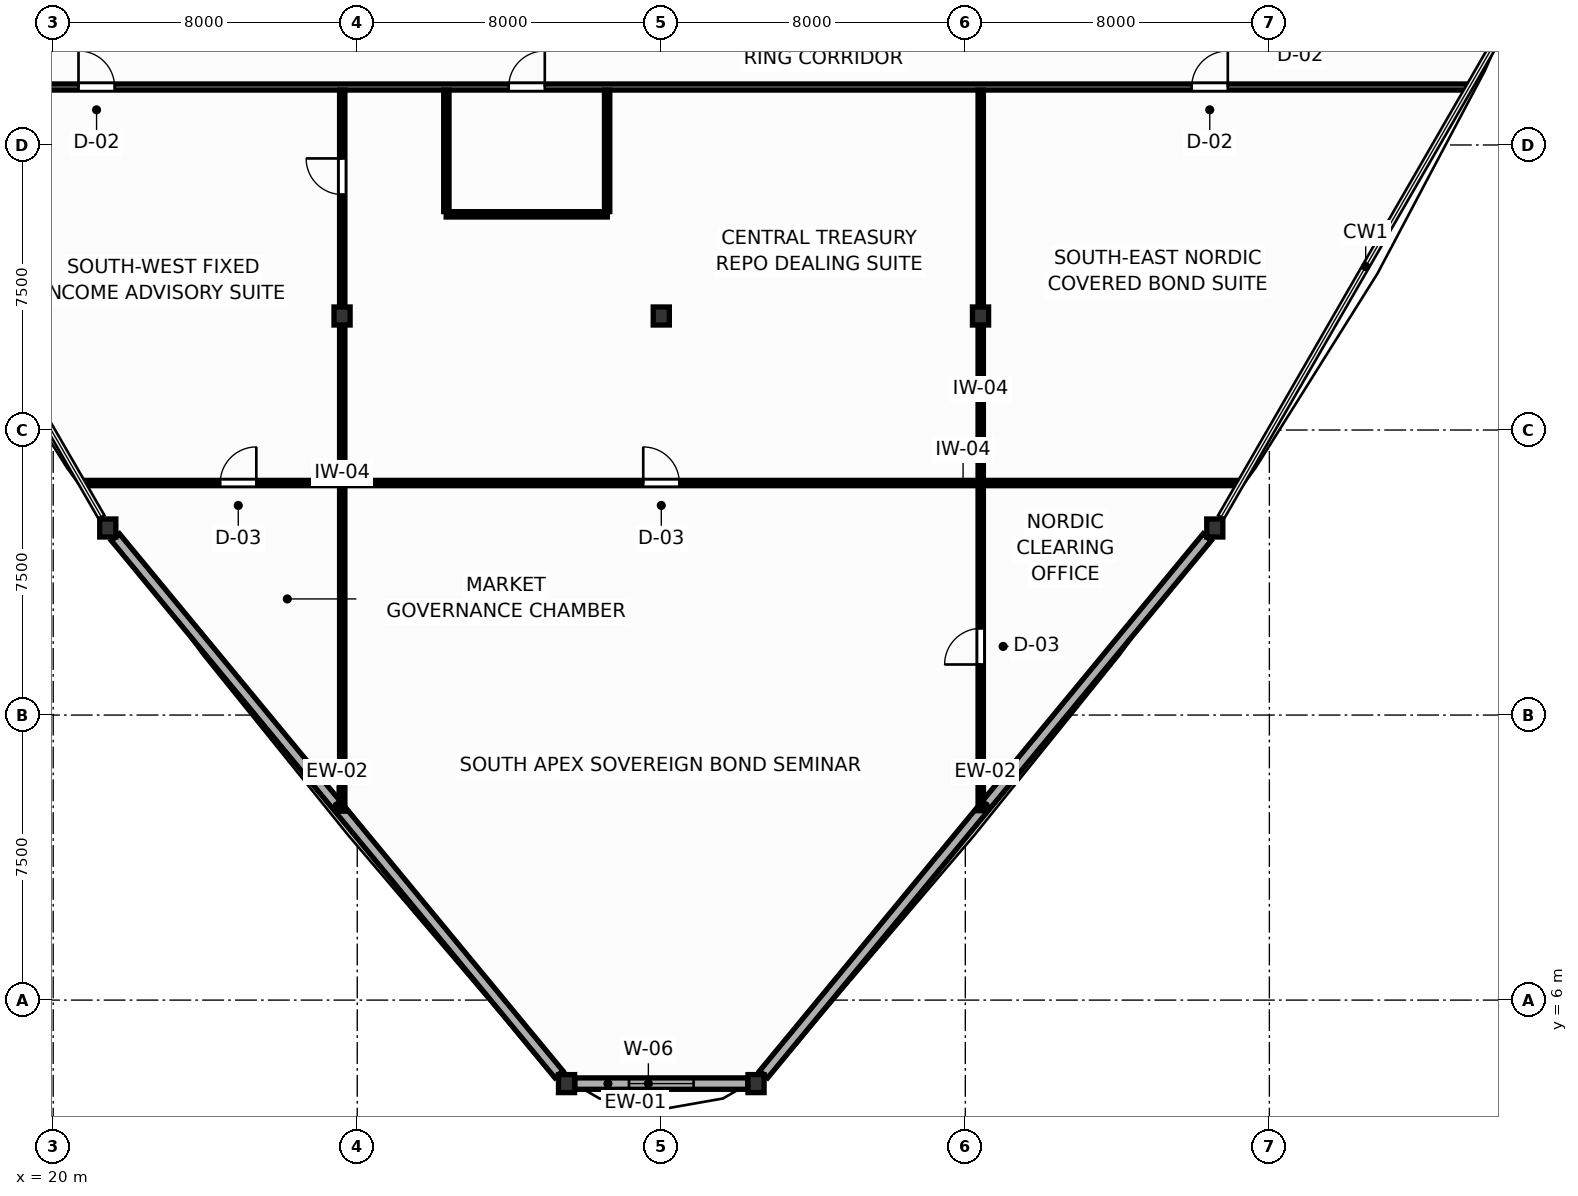
"""IFC4 building model, lengths in metres.
Left out: names, types, materials, properties, quantities, classifications, styles, units other than length and angle.
Written with IfcOpenShell. Run it as: python <this file> out.ifc"""

import sys

from ifc_helpers import new_model, si_unit, direction, frame, frame_2d, origin, origin_2d, place, context, subcontext, project, spatial, rectangle, i_section, extrude, source, transform, mapped, element, fill, save


model = new_model("IFC4")
c1 = context("Model", 3, precision=1e-05, world=origin(), true_north=direction((0.0, 1.0)))
c2 = subcontext(c1, "Body", "Model", "MODEL_VIEW")
j1 = project(units=[si_unit("LENGTHUNIT", "METRE"), si_unit("PLANEANGLEUNIT", "RADIAN")], contexts=[c1])
p1 = place(None, origin())
s1 = spatial("IfcSite", under=j1, at=p1, CompositionType="ELEMENT")
p2 = place(p1, origin())
s2 = spatial("IfcBuilding", under=s1, at=p2, CompositionType="ELEMENT")
p3 = place(p2, frame((0.0, 0.0, 43.5)))
s3 = spatial("IfcBuildingStorey", under=s2, at=p3, CompositionType="ELEMENT", Elevation=43.5)
m1 = source(origin(), c2, "Body", "SweptSolid", [
    extrude(i_section(OverallWidth=0.424, OverallDepth=0.474, WebThickness=0.045, FlangeThickness=0.072, FilletRadius=0.015, at=origin_2d()), origin(), (0.0, 0.0, 1.0), 3.9),
])
for number, where, z_axis, x_axis in (
    (1, (27.6, 24.0, 0.0), (0.0, 0.0, 1.0), (1.0, 0.0, 0.0)),
    (2, (44.4, 24.0, 0.0), (0.0, 0.0, 1.0), (1.0, 0.0, 0.0)),
    (3, (36.0, 24.0, 0.0), (0.0, 0.0, 1.0), (1.0, 0.0, 0.0)),
    (4, (21.436, 18.422, 0.0), (0.0, 0.0, 1.0), (1.0, 0.0, 0.0)),
    (5, (33.507, 3.803, 0.0), (0.0, 0.0, 1.0), (1.0, 0.0, 0.0)),
    (6, (38.493, 3.803, 0.0), (0.0, 0.0, 1.0), (1.0, 0.0, 0.0)),
    (7, (50.564, 18.422, 0.0), (0.0, 0.0, 1.0), (1.0, 0.0, 0.0)),
):
    element("IfcColumn", number, at=place(p3, frame(where, z_axis=z_axis, x_axis=x_axis)), inside=s3, PredefinedType="COLUMN", context=c2, shape_type="MappedRepresentation", body=[
        mapped(m1, transform((0.0, 0.0, 0.0), scale=1.0)),
    ])
p4 = place(p3, frame((21.636, 18.18, 0.0), z_axis=(0.0, 0.0, 1.0), x_axis=(0.636707615974, -0.771105318203, 0.0)))
e8 = element("IfcWall", 8, at=p4, inside=s3, PredefinedType="SOLIDWALL", context=c2, shape_type="SweptSolid", body=[
    extrude(rectangle(XDim=18.331, YDim=0.28, at=frame_2d((9.166, 0.0))), origin(), (0.0, 0.0, 1.0), 2.08),
])
p5 = place(p3, frame((33.724, 3.803, 0.0), z_axis=(0.0, 0.0, 1.0), x_axis=(1.0, 0.0, 0.0)))
e9 = element("IfcWall", 9, at=p5, inside=s3, PredefinedType="SOLIDWALL", context=c2, shape_type="SweptSolid", body=[
    extrude(rectangle(XDim=4.552, YDim=0.3, at=frame_2d((2.276, 0.0))), origin(), (0.0, 0.0, 1.0), 2.08),
])
p6 = place(p5, frame((1.426, 0.0, 0.75)))
e10 = element("IfcOpeningElement", 10, at=p6, cuts=e9, PredefinedType="OPENING", context=c2, shape_type="SweptSolid", body=[
    extrude(rectangle(XDim=1.7, YDim=1.15, at=frame_2d((0.85, 0.575))), frame((0.0, 0.16, 0.0), z_axis=(0.0, -1.0, 0.0), x_axis=(1.0, 0.0, 0.0)), (0.0, 0.0, 1.0), 0.32),
])
p7 = place(p3, frame((38.693, 4.045, 0.0), z_axis=(0.0, 0.0, 1.0), x_axis=(0.636707615974, 0.771105318203, 0.0)))
e11 = element("IfcWall", 11, at=p7, inside=s3, PredefinedType="SOLIDWALL", context=c2, shape_type="SweptSolid", body=[
    extrude(rectangle(XDim=18.331, YDim=0.28, at=frame_2d((9.166, 0.0))), origin(), (0.0, 0.0, 1.0), 2.08),
])
p8 = place(p3, frame((14.757, 30.025, 0.0), z_axis=(0.0, 0.0, 1.0), x_axis=(1.0, 0.0, 0.0)))
e12 = element("IfcWall", 12, at=p8, inside=s3, PredefinedType="PARTITIONING", context=c2, shape_type="SweptSolid", body=[
    extrude(rectangle(XDim=42.485, YDim=0.16, at=frame_2d((21.243, 0.0))), origin(), (0.0, 0.0, 1.0), 3.68),
])
p9 = place(p8, frame((17.228, 0.0, 0.0)))
e13 = element("IfcOpeningElement", 13, at=p9, cuts=e12, PredefinedType="OPENING", context=c2, shape_type="SweptSolid", body=[
    extrude(rectangle(XDim=0.95, YDim=2.05, at=frame_2d((0.475, 1.025))), frame((0.0, 0.09, 0.0), z_axis=(0.0, -1.0, 0.0), x_axis=(1.0, 0.0, 0.0)), (0.0, 0.0, 1.0), 0.18),
])
p10 = place(p8, frame((5.908, 0.0, 0.0)))
e14 = element("IfcOpeningElement", 14, at=p10, cuts=e12, PredefinedType="OPENING", context=c2, shape_type="SweptSolid", body=[
    extrude(rectangle(XDim=0.95, YDim=2.05, at=frame_2d((0.475, 1.025))), frame((0.0, 0.09, 0.0), z_axis=(0.0, -1.0, 0.0), x_axis=(1.0, 0.0, 0.0)), (0.0, 0.0, 1.0), 0.18),
])
p11 = place(p8, frame((35.199, 0.0, 0.0)))
e15 = element("IfcOpeningElement", 15, at=p11, cuts=e12, PredefinedType="OPENING", context=c2, shape_type="SweptSolid", body=[
    extrude(rectangle(XDim=0.95, YDim=2.05, at=frame_2d((0.475, 1.025))), frame((0.0, 0.09, 0.0), z_axis=(0.0, -1.0, 0.0), x_axis=(1.0, 0.0, 0.0)), (0.0, 0.0, 1.0), 0.18),
])
p12 = place(p3, frame((20.773, 19.605, 0.0), z_axis=(0.0, 0.0, 1.0), x_axis=(1.0, 0.0, 0.0)))
e16 = element("IfcWall", 16, at=p12, inside=s3, PredefinedType="PARTITIONING", context=c2, shape_type="SweptSolid", body=[
    extrude(rectangle(XDim=30.454, YDim=0.14, at=frame_2d((15.227, 0.0))), origin(), (0.0, 0.0, 1.0), 3.68),
])
p13 = place(p12, frame((3.621, 0.0, 0.0)))
e17 = element("IfcOpeningElement", 17, at=p13, cuts=e16, PredefinedType="OPENING", context=c2, shape_type="SweptSolid", body=[
    extrude(rectangle(XDim=0.95, YDim=2.05, at=frame_2d((0.475, 1.025))), frame((0.0, 0.08, 0.0), z_axis=(0.0, -1.0, 0.0), x_axis=(1.0, 0.0, 0.0)), (0.0, 0.0, 1.0), 0.16),
])
p14 = place(p12, frame((14.752, 0.0, 0.0)))
e18 = element("IfcOpeningElement", 18, at=p14, cuts=e16, PredefinedType="OPENING", context=c2, shape_type="SweptSolid", body=[
    extrude(rectangle(XDim=0.95, YDim=2.05, at=frame_2d((0.475, 1.025))), frame((0.0, 0.08, 0.0), z_axis=(0.0, -1.0, 0.0), x_axis=(1.0, 0.0, 0.0)), (0.0, 0.0, 1.0), 0.16),
])
p15 = place(p3, frame((27.605, 10.971, 0.0), z_axis=(0.0, 0.0, 1.0), x_axis=(0.0, 1.0, 0.0)))
e19 = element("IfcWall", 19, at=p15, inside=s3, PredefinedType="PARTITIONING", context=c2, shape_type="SweptSolid", body=[
    extrude(rectangle(XDim=18.972, YDim=0.14, at=frame_2d((9.486, 0.0))), origin(), (0.0, 0.0, 1.0), 2.24),
])
p16 = place(p15, frame((16.225, 0.0, 0.0)))
e20 = element("IfcOpeningElement", 20, at=p16, cuts=e19, PredefinedType="OPENING", context=c2, shape_type="SweptSolid", body=[
    extrude(rectangle(XDim=0.95, YDim=2.05, at=frame_2d((0.475, 1.025))), frame((0.0, 0.08, 0.0), z_axis=(0.0, -1.0, 0.0), x_axis=(1.0, 0.0, 0.0)), (0.0, 0.0, 1.0), 0.16),
])
p17 = place(p3, frame((44.405, 10.983, 0.0), z_axis=(0.0, 0.0, 1.0), x_axis=(0.0, 1.0, 0.0)))
e21 = element("IfcWall", 21, at=p17, inside=s3, PredefinedType="PARTITIONING", context=c2, shape_type="SweptSolid", body=[
    extrude(rectangle(XDim=18.96, YDim=0.14, at=frame_2d((9.48, 0.0))), origin(), (0.0, 0.0, 1.0), 2.24),
])
p18 = place(p17, frame((3.847, 0.0, 0.0)))
e22 = element("IfcOpeningElement", 22, at=p18, cuts=e21, PredefinedType="OPENING", context=c2, shape_type="SweptSolid", body=[
    extrude(rectangle(XDim=0.95, YDim=2.05, at=frame_2d((0.475, 1.025))), frame((0.0, 0.08, 0.0), z_axis=(0.0, -1.0, 0.0), x_axis=(1.0, 0.0, 0.0)), (0.0, 0.0, 1.0), 0.16),
])
p19 = place(p3, frame((30.34, 26.675, 0.0), z_axis=(0.0, 0.0, 1.0), x_axis=(1.0, 0.0, 0.0)))
e23 = element("IfcWall", 23, at=p19, inside=s3, PredefinedType="PARTITIONING", context=c2, shape_type="SweptSolid", body=[
    extrude(rectangle(XDim=4.24, YDim=0.14, at=frame_2d((2.12, 0.0))), origin(), (0.0, 0.0, 1.0), 3.68),
])
for number, where, z_axis, x_axis in (
    (24, (34.575, 26.747, 0.0), (0.0, 0.0, 1.0), (0.0, 1.0, 0.0)),
    (25, (30.345, 26.747, 0.0), (0.0, 0.0, 1.0), (0.0, 1.0, 0.0)),
):
    element("IfcWall", number, at=place(p3, frame(where, z_axis=z_axis, x_axis=x_axis)), inside=s3, PredefinedType="PARTITIONING", context=c2, shape_type="SweptSolid", body=[
        extrude(rectangle(XDim=3.196, YDim=0.14, at=frame_2d((1.598, 0.0))), origin(), (0.0, 0.0, 1.0), 3.68),
    ])
p20 = place(p6, origin())
e26 = element("IfcWindow", 26, at=p20, inside=s3, PartitioningType="SINGLE_PANEL", PredefinedType="WINDOW", context=c2, shape_type="SweptSolid", body=[
    extrude(rectangle(XDim=1.7, YDim=1.15, at=frame_2d((0.85, 0.575))), frame((0.0, 0.03, 0.0), z_axis=(0.0, -1.0, 0.0), x_axis=(1.0, 0.0, 0.0)), (0.0, 0.0, 1.0), 0.06),
])
fill(e10, e26)
p21 = place(p9, origin())
e27 = element("IfcDoor", 27, at=p21, inside=s3, OperationType="SINGLE_SWING_RIGHT", PredefinedType="DOOR", context=c2, shape_type="SweptSolid", body=[
    extrude(rectangle(XDim=0.95, YDim=2.05, at=frame_2d((0.475, 1.025))), frame((0.0, 0.025, 0.0), z_axis=(0.0, -1.0, 0.0), x_axis=(1.0, 0.0, 0.0)), (0.0, 0.0, 1.0), 0.05),
])
fill(e13, e27)
p22 = place(p10, origin())
e28 = element("IfcDoor", 28, at=p22, inside=s3, OperationType="SINGLE_SWING_LEFT", PredefinedType="DOOR", context=c2, shape_type="SweptSolid", body=[
    extrude(rectangle(XDim=0.95, YDim=2.05, at=frame_2d((0.475, 1.025))), frame((0.0, 0.025, 0.0), z_axis=(0.0, -1.0, 0.0), x_axis=(1.0, 0.0, 0.0)), (0.0, 0.0, 1.0), 0.05),
])
fill(e14, e28)
p23 = place(p11, origin())
e29 = element("IfcDoor", 29, at=p23, inside=s3, OperationType="SINGLE_SWING_RIGHT", PredefinedType="DOOR", context=c2, shape_type="SweptSolid", body=[
    extrude(rectangle(XDim=0.95, YDim=2.05, at=frame_2d((0.475, 1.025))), frame((0.0, 0.025, 0.0), z_axis=(0.0, -1.0, 0.0), x_axis=(1.0, 0.0, 0.0)), (0.0, 0.0, 1.0), 0.05),
])
fill(e15, e29)
p24 = place(p13, origin())
e30 = element("IfcDoor", 30, at=p24, inside=s3, OperationType="SINGLE_SWING_RIGHT", PredefinedType="DOOR", context=c2, shape_type="SweptSolid", body=[
    extrude(rectangle(XDim=0.95, YDim=2.05, at=frame_2d((0.475, 1.025))), frame((0.0, 0.025, 0.0), z_axis=(0.0, -1.0, 0.0), x_axis=(1.0, 0.0, 0.0)), (0.0, 0.0, 1.0), 0.05),
])
fill(e17, e30)
p25 = place(p14, origin())
e31 = element("IfcDoor", 31, at=p25, inside=s3, OperationType="SINGLE_SWING_LEFT", PredefinedType="DOOR", context=c2, shape_type="SweptSolid", body=[
    extrude(rectangle(XDim=0.95, YDim=2.05, at=frame_2d((0.475, 1.025))), frame((0.0, 0.025, 0.0), z_axis=(0.0, -1.0, 0.0), x_axis=(1.0, 0.0, 0.0)), (0.0, 0.0, 1.0), 0.05),
])
fill(e18, e31)
p26 = place(p16, origin())
e32 = element("IfcDoor", 32, at=p26, inside=s3, OperationType="SINGLE_SWING_RIGHT", PredefinedType="DOOR", context=c2, shape_type="SweptSolid", body=[
    extrude(rectangle(XDim=0.95, YDim=2.05, at=frame_2d((0.475, 1.025))), frame((0.0, 0.025, 0.0), z_axis=(0.0, -1.0, 0.0), x_axis=(1.0, 0.0, 0.0)), (0.0, 0.0, 1.0), 0.05),
])
fill(e20, e32)
p27 = place(p18, origin())
e33 = element("IfcDoor", 33, at=p27, inside=s3, OperationType="SINGLE_SWING_LEFT", PredefinedType="DOOR", context=c2, shape_type="SweptSolid", body=[
    extrude(rectangle(XDim=0.95, YDim=2.05, at=frame_2d((0.475, 1.025))), frame((0.0, 0.025, 0.0), z_axis=(0.0, -1.0, 0.0), x_axis=(1.0, 0.0, 0.0)), (0.0, 0.0, 1.0), 0.05),
])
fill(e22, e33)
save(model, sys.argv[1])
